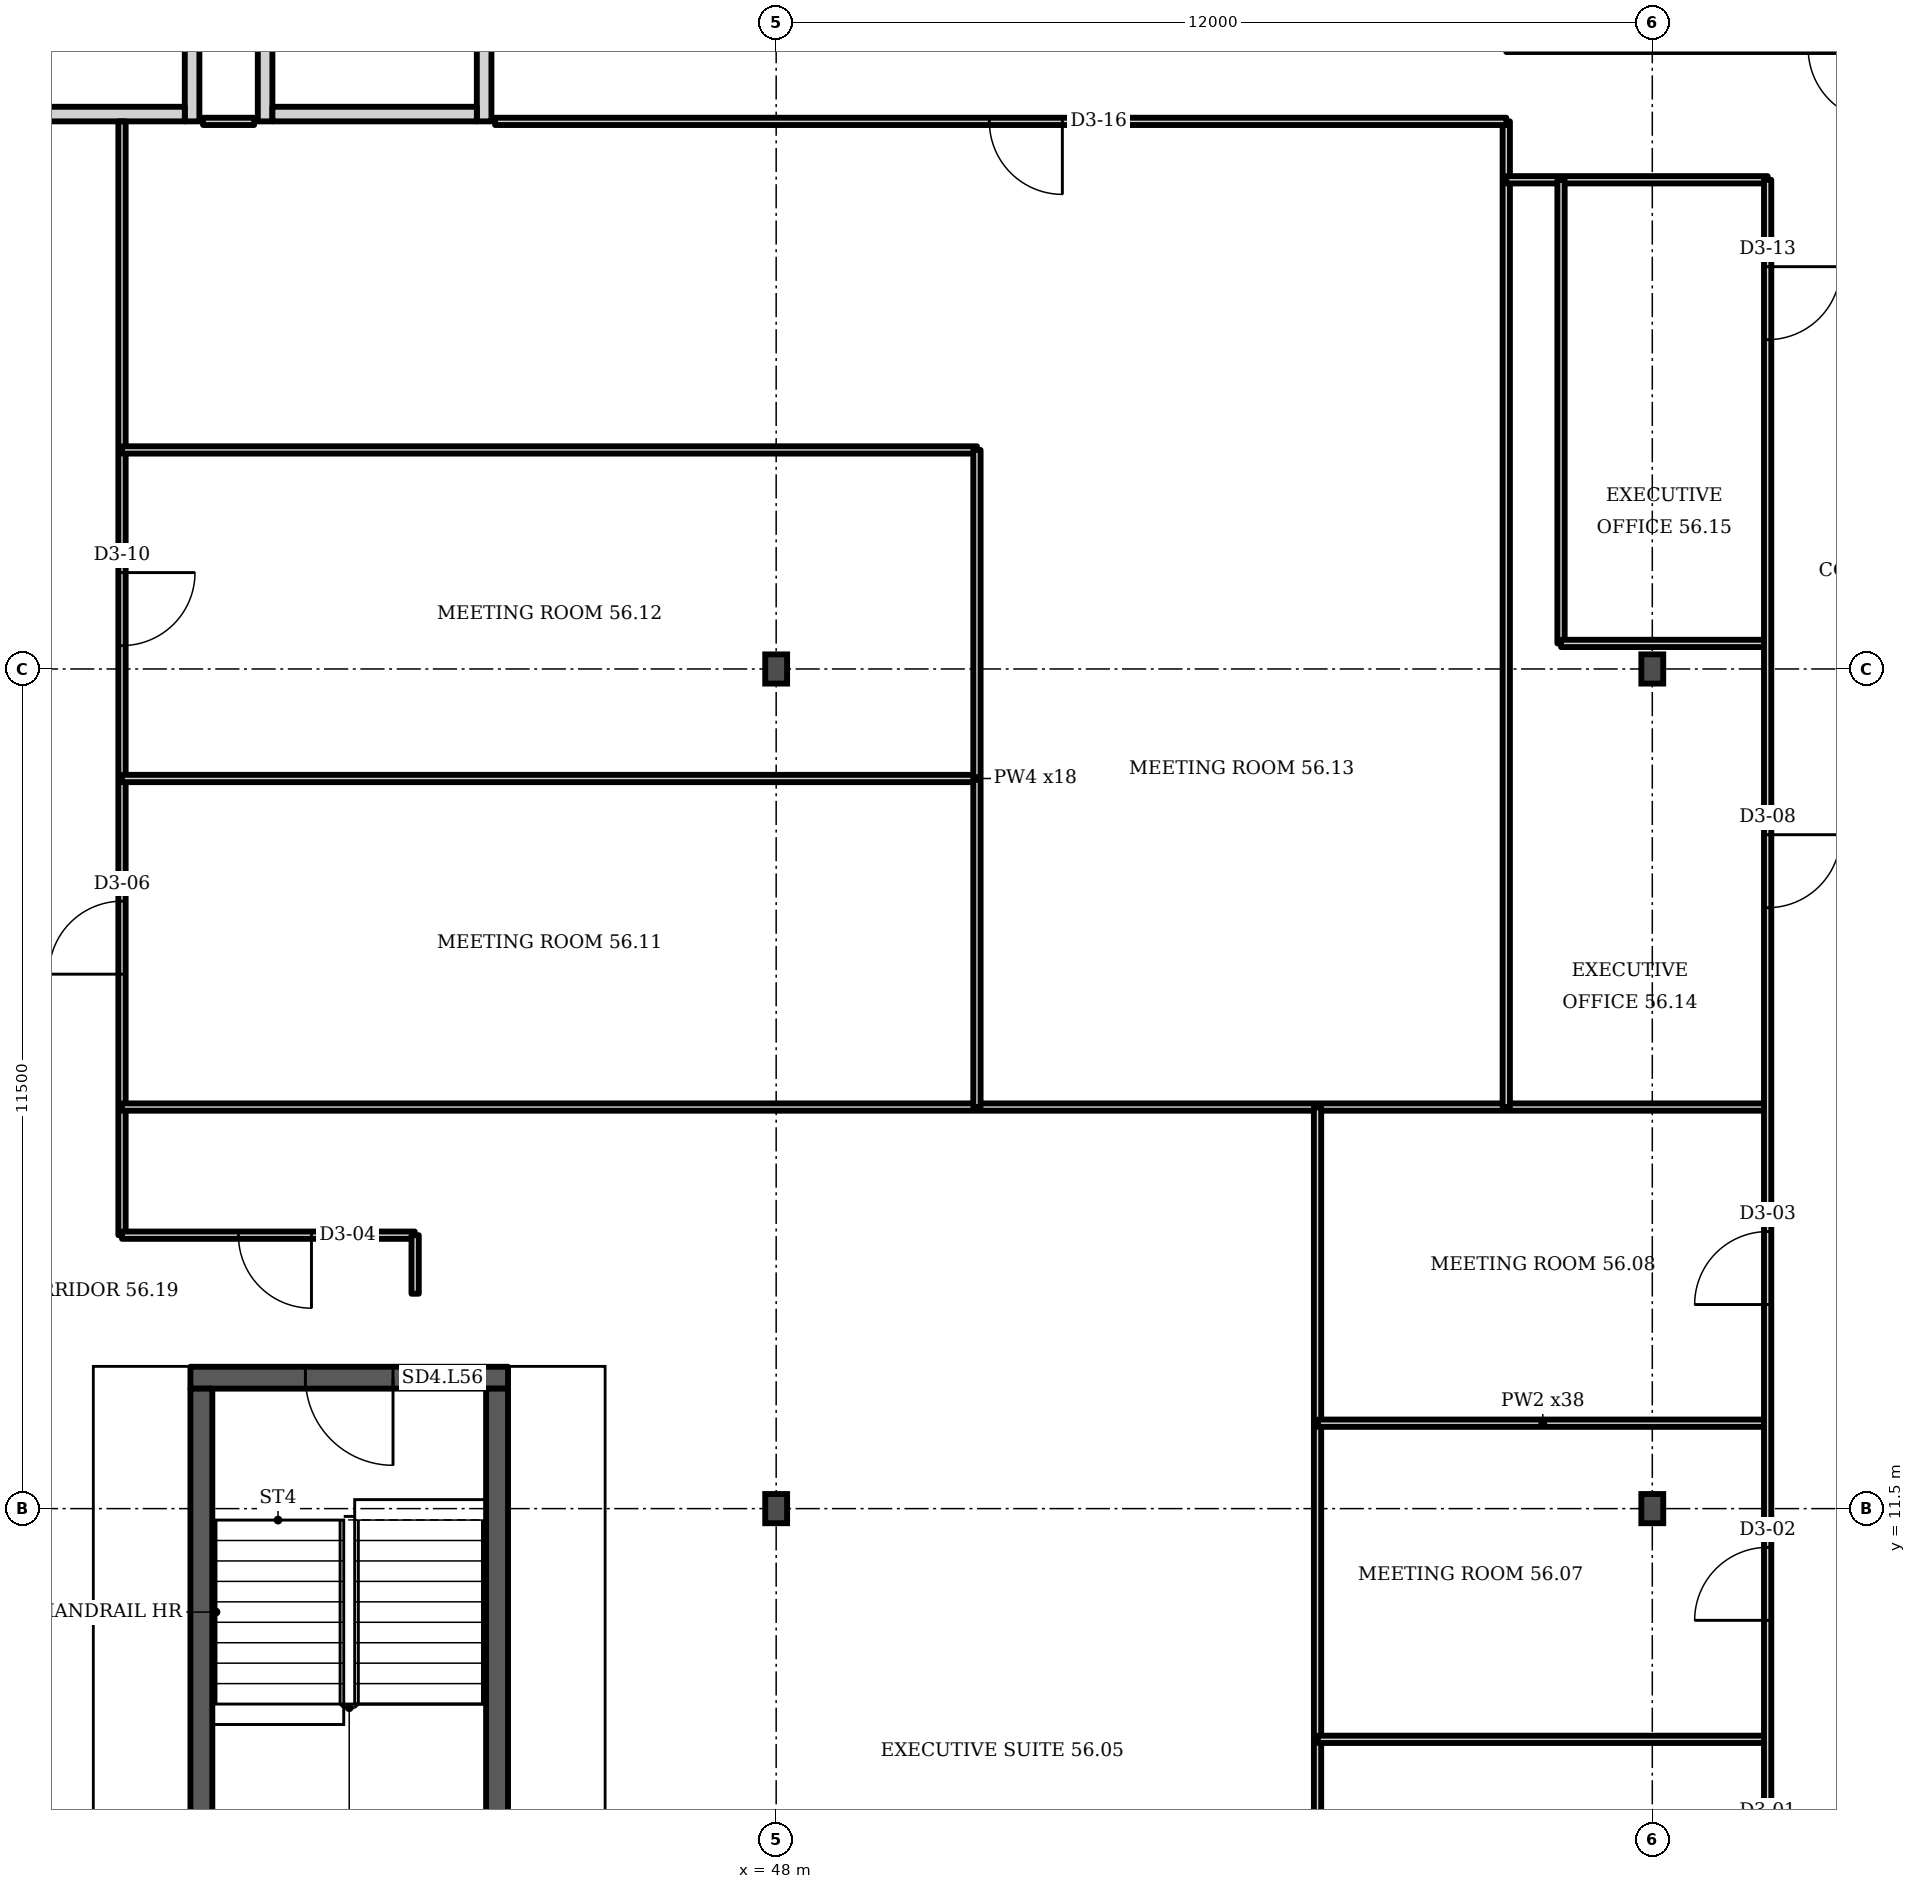
"""IFC4 building model, lengths in metres.
Left out: names, types, materials, properties, quantities, classifications, styles, units other than length and angle.
Written with IfcOpenShell. Run it as: python <this file> out.ifc"""

import sys

from ifc_helpers import new_model, si_unit, direction, frame, frame_2d, origin, origin_2d, place, context, subcontext, project, spatial, rectangle, i_section, extrude, element, fill, save


model = new_model("IFC4")
c1 = context("Model", 3, precision=1e-05, world=origin(), true_north=direction((0.0, 1.0)))
c2 = subcontext(c1, "Body", "Model", "MODEL_VIEW")
j1 = project(units=[si_unit("LENGTHUNIT", "METRE"), si_unit("PLANEANGLEUNIT", "RADIAN")], contexts=[c1])
p1 = place(None, origin())
s1 = spatial("IfcSite", under=j1, at=p1, CompositionType="ELEMENT")
p2 = place(p1, origin())
s2 = spatial("IfcBuilding", under=s1, at=p2, CompositionType="ELEMENT")
p3 = place(p2, frame((0.0, 0.0, 225.1)))
s3 = spatial("IfcBuildingStorey", under=s2, at=p3, CompositionType="ELEMENT", Elevation=225.1)
for number, where, z_axis, x_axis in (
    (1, (48.0, 11.5, 0.0), (0.0, 0.0, 1.0), (1.0, 0.0, 0.0)),
    (2, (60.0, 11.5, 0.0), (0.0, 0.0, 1.0), (1.0, 0.0, 0.0)),
    (3, (48.0, 23.0, 0.0), (0.0, 0.0, 1.0), (1.0, 0.0, 0.0)),
    (4, (60.0, 23.0, 0.0), (0.0, 0.0, 1.0), (1.0, 0.0, 0.0)),
):
    element("IfcColumn", number, at=place(p3, frame(where, z_axis=z_axis, x_axis=x_axis)), inside=s3, PredefinedType="COLUMN", context=c2, shape_type="SweptSolid", body=[
        extrude(i_section(OverallWidth=0.3, OverallDepth=0.4, WebThickness=0.013, FlangeThickness=0.024, FilletRadius=0.027, at=origin_2d()), origin(), (0.0, 0.0, 1.0), 3.6),
    ])
p4 = place(p3, frame((40.0, 30.5, 0.0), z_axis=(0.0, 0.0, 1.0), x_axis=(0.0, 1.0, 0.0)))
e5 = element("IfcWall", 5, at=p4, inside=s3, PredefinedType="PARTITIONING", context=c2, shape_type="SweptSolid", body=[
    extrude(rectangle(XDim=3.5, YDim=0.2, at=frame_2d((1.75, 0.0))), origin(), (0.0, 0.0, 1.0), 3.2),
])
p5 = place(p3, frame((37.1, 30.6, 0.0), z_axis=(0.0, 0.0, 1.0), x_axis=(1.0, 0.0, 0.0)))
e6 = element("IfcWall", 6, at=p5, inside=s3, PredefinedType="PARTITIONING", context=c2, shape_type="SweptSolid", body=[
    extrude(rectangle(XDim=2.8, YDim=0.2, at=frame_2d((1.4, 0.0))), origin(), (0.0, 0.0, 1.0), 3.2),
])
p6 = place(p3, frame((41.0, 30.5, 0.0), z_axis=(0.0, 0.0, 1.0), x_axis=(0.0, 1.0, 0.0)))
e7 = element("IfcWall", 7, at=p6, inside=s3, PredefinedType="PARTITIONING", context=c2, shape_type="SweptSolid", body=[
    extrude(rectangle(XDim=3.5, YDim=0.2, at=frame_2d((1.75, 0.0))), origin(), (0.0, 0.0, 1.0), 3.2),
])
p7 = place(p3, frame((44.0, 30.5, 0.0), z_axis=(0.0, 0.0, 1.0), x_axis=(0.0, 1.0, 0.0)))
e8 = element("IfcWall", 8, at=p7, inside=s3, PredefinedType="PARTITIONING", context=c2, shape_type="SweptSolid", body=[
    extrude(rectangle(XDim=3.5, YDim=0.2, at=frame_2d((1.75, 0.0))), origin(), (0.0, 0.0, 1.0), 3.2),
])
p8 = place(p7, frame((1.2, 0.0, 0.0)))
e9 = element("IfcOpeningElement", 9, at=p8, cuts=e8, PredefinedType="OPENING", context=c2, shape_type="SweptSolid", body=[
    extrude(rectangle(XDim=1.1, YDim=2.1, at=frame_2d((0.55, 1.05))), frame((0.0, 0.11, 0.0), z_axis=(0.0, -1.0, 0.0), x_axis=(1.0, 0.0, 0.0)), (0.0, 0.0, 1.0), 0.22),
])
p9 = place(p3, frame((41.1, 30.6, 0.0), z_axis=(0.0, 0.0, 1.0), x_axis=(1.0, 0.0, 0.0)))
e10 = element("IfcWall", 10, at=p9, inside=s3, PredefinedType="PARTITIONING", context=c2, shape_type="SweptSolid", body=[
    extrude(rectangle(XDim=2.8, YDim=0.2, at=frame_2d((1.4, 0.0))), origin(), (0.0, 0.0, 1.0), 3.2),
])
p10 = place(p3, frame((39.977, 13.293, 0.0), z_axis=(0.0, 0.0, 1.0), x_axis=(1.0, 0.0, 0.0)))
e11 = element("IfcWall", 11, at=p10, inside=s3, PredefinedType="SHEAR", context=c2, shape_type="SweptSolid", body=[
    extrude(rectangle(XDim=4.35, YDim=0.3, at=frame_2d((2.175, 0.0))), origin(), (0.0, 0.0, 1.0), 3.2),
])
p11 = place(p10, frame((1.575, 0.0, 0.0)))
e12 = element("IfcOpeningElement", 12, at=p11, cuts=e11, PredefinedType="OPENING", context=c2, shape_type="SweptSolid", body=[
    extrude(rectangle(XDim=1.2, YDim=2.1, at=frame_2d((0.6, 1.05))), frame((0.0, 0.16, 0.0), z_axis=(0.0, -1.0, 0.0), x_axis=(1.0, 0.0, 0.0)), (0.0, 0.0, 1.0), 0.32),
])
p12 = place(p3, frame((39.04, 15.245, 0.0), z_axis=(0.0, 0.0, 1.0), x_axis=(0.0, 1.0, 0.0)))
e13 = element("IfcWall", 13, at=p12, inside=s3, PredefinedType="PARTITIONING", context=c2, shape_type="SweptSolid", body=[
    extrude(rectangle(XDim=15.255, YDim=0.1, at=frame_2d((7.627, 0.0))), origin(), (0.0, 0.0, 1.0), 3.2),
])
p13 = place(p12, frame((3.575, 0.0, 0.0)))
e14 = element("IfcOpeningElement", 14, at=p13, cuts=e13, PredefinedType="OPENING", context=c2, shape_type="SweptSolid", body=[
    extrude(rectangle(XDim=1.0, YDim=2.1, at=frame_2d((0.5, 1.05))), frame((0.0, 0.06, 0.0), z_axis=(0.0, -1.0, 0.0), x_axis=(1.0, 0.0, 0.0)), (0.0, 0.0, 1.0), 0.12),
])
p14 = place(p12, frame((8.075, 0.0, 0.0)))
e15 = element("IfcOpeningElement", 15, at=p14, cuts=e13, PredefinedType="OPENING", context=c2, shape_type="SweptSolid", body=[
    extrude(rectangle(XDim=1.0, YDim=2.1, at=frame_2d((0.5, 1.05))), frame((0.0, 0.06, 0.0), z_axis=(0.0, -1.0, 0.0), x_axis=(1.0, 0.0, 0.0)), (0.0, 0.0, 1.0), 0.12),
])
p15 = place(p3, frame((39.04, 15.245, 0.0), z_axis=(0.0, 0.0, 1.0), x_axis=(1.0, 0.0, 0.0)))
e16 = element("IfcWall", 16, at=p15, inside=s3, PredefinedType="PARTITIONING", context=c2, shape_type="SweptSolid", body=[
    extrude(rectangle(XDim=4.01, YDim=0.1, at=frame_2d((2.005, 0.0))), origin(), (0.0, 0.0, 1.0), 3.2),
])
p16 = place(p15, frame((1.595, 0.0, 0.0)))
e17 = element("IfcOpeningElement", 17, at=p16, cuts=e16, PredefinedType="OPENING", context=c2, shape_type="SweptSolid", body=[
    extrude(rectangle(XDim=1.0, YDim=2.1, at=frame_2d((0.5, 1.05))), frame((0.0, 0.06, 0.0), z_axis=(0.0, -1.0, 0.0), x_axis=(1.0, 0.0, 0.0)), (0.0, 0.0, 1.0), 0.12),
])
p17 = place(p3, frame((39.04, 17.0, 0.0), z_axis=(0.0, 0.0, 1.0), x_axis=(1.0, 0.0, 0.0)))
e18 = element("IfcWall", 18, at=p17, inside=s3, PredefinedType="PARTITIONING", context=c2, shape_type="SweptSolid", body=[
    extrude(rectangle(XDim=22.54, YDim=0.1, at=frame_2d((11.27, 0.0))), origin(), (0.0, 0.0, 1.0), 3.2),
])
for number, where, z_axis, x_axis in (
    (19, (39.04, 21.5, 0.0), (0.0, 0.0, 1.0), (1.0, 0.0, 0.0)),
    (20, (39.04, 26.0, 0.0), (0.0, 0.0, 1.0), (1.0, 0.0, 0.0)),
):
    element("IfcWall", number, at=place(p3, frame(where, z_axis=z_axis, x_axis=x_axis)), inside=s3, PredefinedType="PARTITIONING", context=c2, shape_type="SweptSolid", body=[
        extrude(rectangle(XDim=11.71, YDim=0.1, at=frame_2d((5.855, 0.0))), origin(), (0.0, 0.0, 1.0), 3.2),
    ])
p18 = place(p3, frame((40.15, 30.5, 0.0), z_axis=(0.0, 0.0, 1.0), x_axis=(1.0, 0.0, 0.0)))
e21 = element("IfcWall", 21, at=p18, inside=s3, PredefinedType="PARTITIONING", context=c2, shape_type="SweptSolid", body=[
    extrude(rectangle(XDim=0.7, YDim=0.1, at=frame_2d((0.35, 0.0))), origin(), (0.0, 0.0, 1.0), 3.2),
])
p19 = place(p3, frame((43.055, 14.443, 0.0), z_axis=(0.0, 0.0, 1.0), x_axis=(0.0, 1.0, 0.0)))
e22 = element("IfcWall", 22, at=p19, inside=s3, PredefinedType="PARTITIONING", context=c2, shape_type="SweptSolid", body=[
    extrude(rectangle(XDim=0.802, YDim=0.1, at=frame_2d((0.401, 0.0))), origin(), (0.0, 0.0, 1.0), 3.2),
])
p20 = place(p3, frame((50.75, 17.0, 0.0), z_axis=(0.0, 0.0, 1.0), x_axis=(0.0, 1.0, 0.0)))
e23 = element("IfcWall", 23, at=p20, inside=s3, PredefinedType="PARTITIONING", context=c2, shape_type="SweptSolid", body=[
    extrude(rectangle(XDim=9.0, YDim=0.1, at=frame_2d((4.5, 0.0))), origin(), (0.0, 0.0, 1.0), 3.2),
])
p21 = place(p3, frame((55.415, 4.345, 0.0), z_axis=(0.0, 0.0, 1.0), x_axis=(0.0, 1.0, 0.0)))
e24 = element("IfcWall", 24, at=p21, inside=s3, PredefinedType="PARTITIONING", context=c2, shape_type="SweptSolid", body=[
    extrude(rectangle(XDim=12.65, YDim=0.1, at=frame_2d((6.325, 0.0))), origin(), (0.0, 0.0, 1.0), 3.2),
])
for number, where, z_axis, x_axis in (
    (25, (55.42, 8.34, 0.0), (0.0, 0.0, 1.0), (1.0, 0.0, 0.0)),
    (26, (55.42, 12.67, 0.0), (0.0, 0.0, 1.0), (1.0, 0.0, 0.0)),
):
    element("IfcWall", number, at=place(p3, frame(where, z_axis=z_axis, x_axis=x_axis)), inside=s3, PredefinedType="PARTITIONING", context=c2, shape_type="SweptSolid", body=[
        extrude(rectangle(XDim=6.16, YDim=0.1, at=frame_2d((3.08, 0.0))), origin(), (0.0, 0.0, 1.0), 3.2),
    ])
p22 = place(p3, frame((58.0, 17.0, 0.0), z_axis=(0.0, 0.0, 1.0), x_axis=(0.0, 1.0, 0.0)))
e27 = element("IfcWall", 27, at=p22, inside=s3, PredefinedType="PARTITIONING", context=c2, shape_type="SweptSolid", body=[
    extrude(rectangle(XDim=13.5, YDim=0.1, at=frame_2d((6.75, 0.0))), origin(), (0.0, 0.0, 1.0), 3.2),
])
p23 = place(p3, frame((58.0, 29.7, 0.0), z_axis=(0.0, 0.0, 1.0), x_axis=(1.0, 0.0, 0.0)))
e28 = element("IfcWall", 28, at=p23, inside=s3, PredefinedType="PARTITIONING", context=c2, shape_type="SweptSolid", body=[
    extrude(rectangle(XDim=3.58, YDim=0.1, at=frame_2d((1.79, 0.0))), origin(), (0.0, 0.0, 1.0), 3.2),
])
p24 = place(p3, frame((58.75, 23.35, 0.0), z_axis=(0.0, 0.0, 1.0), x_axis=(0.0, 1.0, 0.0)))
e29 = element("IfcWall", 29, at=p24, inside=s3, PredefinedType="PARTITIONING", context=c2, shape_type="SweptSolid", body=[
    extrude(rectangle(XDim=6.35, YDim=0.1, at=frame_2d((3.175, 0.0))), origin(), (0.0, 0.0, 1.0), 3.2),
])
p25 = place(p3, frame((58.75, 23.35, 0.0), z_axis=(0.0, 0.0, 1.0), x_axis=(1.0, 0.0, 0.0)))
e30 = element("IfcWall", 30, at=p25, inside=s3, PredefinedType="PARTITIONING", context=c2, shape_type="SweptSolid", body=[
    extrude(rectangle(XDim=2.83, YDim=0.1, at=frame_2d((1.415, 0.0))), origin(), (0.0, 0.0, 1.0), 3.2),
])
p26 = place(p3, frame((61.58, 4.88, 0.0), z_axis=(0.0, 0.0, 1.0), x_axis=(0.0, 1.0, 0.0)))
e31 = element("IfcWall", 31, at=p26, inside=s3, PredefinedType="PARTITIONING", context=c2, shape_type="SweptSolid", body=[
    extrude(rectangle(XDim=24.82, YDim=0.1, at=frame_2d((12.41, 0.0))), origin(), (0.0, 0.0, 1.0), 3.2),
])
p27 = place(p26, frame((1.24, 0.0, 0.0)))
e32 = element("IfcOpeningElement", 32, at=p27, cuts=e31, PredefinedType="OPENING", context=c2, shape_type="SweptSolid", body=[
    extrude(rectangle(XDim=1.0, YDim=2.1, at=frame_2d((0.5, 1.05))), frame((0.0, 0.06, 0.0), z_axis=(0.0, -1.0, 0.0), x_axis=(1.0, 0.0, 0.0)), (0.0, 0.0, 1.0), 0.12),
])
p28 = place(p26, frame((5.09, 0.0, 0.0)))
e33 = element("IfcOpeningElement", 33, at=p28, cuts=e31, PredefinedType="OPENING", context=c2, shape_type="SweptSolid", body=[
    extrude(rectangle(XDim=1.0, YDim=2.1, at=frame_2d((0.5, 1.05))), frame((0.0, 0.06, 0.0), z_axis=(0.0, -1.0, 0.0), x_axis=(1.0, 0.0, 0.0)), (0.0, 0.0, 1.0), 0.12),
])
p29 = place(p26, frame((9.415, 0.0, 0.0)))
e34 = element("IfcOpeningElement", 34, at=p29, cuts=e31, PredefinedType="OPENING", context=c2, shape_type="SweptSolid", body=[
    extrude(rectangle(XDim=1.0, YDim=2.1, at=frame_2d((0.5, 1.05))), frame((0.0, 0.06, 0.0), z_axis=(0.0, -1.0, 0.0), x_axis=(1.0, 0.0, 0.0)), (0.0, 0.0, 1.0), 0.12),
])
p30 = place(p26, frame((14.85, 0.0, 0.0)))
e35 = element("IfcOpeningElement", 35, at=p30, cuts=e31, PredefinedType="OPENING", context=c2, shape_type="SweptSolid", body=[
    extrude(rectangle(XDim=1.0, YDim=2.1, at=frame_2d((0.5, 1.05))), frame((0.0, 0.06, 0.0), z_axis=(0.0, -1.0, 0.0), x_axis=(1.0, 0.0, 0.0)), (0.0, 0.0, 1.0), 0.12),
])
p31 = place(p26, frame((22.63, 0.0, 0.0)))
e36 = element("IfcOpeningElement", 36, at=p31, cuts=e31, PredefinedType="OPENING", context=c2, shape_type="SweptSolid", body=[
    extrude(rectangle(XDim=1.0, YDim=2.1, at=frame_2d((0.5, 1.05))), frame((0.0, 0.06, 0.0), z_axis=(0.0, -1.0, 0.0), x_axis=(1.0, 0.0, 0.0)), (0.0, 0.0, 1.0), 0.12),
])
p32 = place(p3, frame((44.15, 30.5, 0.0), z_axis=(0.0, 0.0, 1.0), x_axis=(1.0, 0.0, 0.0)))
e37 = element("IfcWall", 37, at=p32, inside=s3, PredefinedType="PARTITIONING", context=c2, shape_type="SweptSolid", body=[
    extrude(rectangle(XDim=13.85, YDim=0.1, at=frame_2d((6.925, 0.0))), origin(), (0.0, 0.0, 1.0), 3.2),
])
p33 = place(p32, frame((6.77, 0.0, 0.0)))
e38 = element("IfcOpeningElement", 38, at=p33, cuts=e37, PredefinedType="OPENING", context=c2, shape_type="SweptSolid", body=[
    extrude(rectangle(XDim=1.0, YDim=2.1, at=frame_2d((0.5, 1.05))), frame((0.0, 0.06, 0.0), z_axis=(0.0, -1.0, 0.0), x_axis=(1.0, 0.0, 0.0)), (0.0, 0.0, 1.0), 0.12),
])
for number, where, z_axis, x_axis in (
    (39, (40.127, 5.643, 0.0), (0.0, 0.0, 1.0), (0.0, 1.0, 0.0)),
    (40, (44.177, 5.643, 0.0), (0.0, 0.0, 1.0), (0.0, 1.0, 0.0)),
):
    element("IfcWall", number, at=place(p3, frame(where, z_axis=z_axis, x_axis=x_axis)), inside=s3, PredefinedType="SHEAR", context=c2, shape_type="SweptSolid", body=[
        extrude(rectangle(XDim=7.5, YDim=0.3, at=frame_2d((3.75, 0.0))), origin(), (0.0, 0.0, 1.0), 3.2),
    ])
p34 = place(p11, origin())
e41 = element("IfcDoor", 41, at=p34, inside=s3, OperationType="SINGLE_SWING_RIGHT", PredefinedType="DOOR", context=c2, shape_type="SweptSolid", body=[
    extrude(rectangle(XDim=1.2, YDim=2.1, at=frame_2d((0.6, 1.05))), frame((0.0, 0.025, 0.0), z_axis=(0.0, -1.0, 0.0), x_axis=(1.0, 0.0, 0.0)), (0.0, 0.0, 1.0), 0.05),
])
fill(e12, e41)
p35 = place(p28, origin())
e42 = element("IfcDoor", 42, at=p35, inside=s3, OperationType="SINGLE_SWING_LEFT", PredefinedType="DOOR", context=c2, shape_type="SweptSolid", body=[
    extrude(rectangle(XDim=1.0, YDim=2.1, at=frame_2d((0.5, 1.05))), frame((0.0, 0.025, 0.0), z_axis=(0.0, -1.0, 0.0), x_axis=(1.0, 0.0, 0.0)), (0.0, 0.0, 1.0), 0.05),
])
fill(e33, e42)
p36 = place(p29, origin())
e43 = element("IfcDoor", 43, at=p36, inside=s3, OperationType="SINGLE_SWING_LEFT", PredefinedType="DOOR", context=c2, shape_type="SweptSolid", body=[
    extrude(rectangle(XDim=1.0, YDim=2.1, at=frame_2d((0.5, 1.05))), frame((0.0, 0.025, 0.0), z_axis=(0.0, -1.0, 0.0), x_axis=(1.0, 0.0, 0.0)), (0.0, 0.0, 1.0), 0.05),
])
fill(e34, e43)
p37 = place(p16, origin())
e44 = element("IfcDoor", 44, at=p37, inside=s3, OperationType="SINGLE_SWING_RIGHT", PredefinedType="DOOR", context=c2, shape_type="SweptSolid", body=[
    extrude(rectangle(XDim=1.0, YDim=2.1, at=frame_2d((0.5, 1.05))), frame((0.0, 0.025, 0.0), z_axis=(0.0, -1.0, 0.0), x_axis=(1.0, 0.0, 0.0)), (0.0, 0.0, 1.0), 0.05),
])
fill(e17, e44)
p38 = place(p13, origin())
e45 = element("IfcDoor", 45, at=p38, inside=s3, OperationType="SINGLE_SWING_LEFT", PredefinedType="DOOR", context=c2, shape_type="SweptSolid", body=[
    extrude(rectangle(XDim=1.0, YDim=2.1, at=frame_2d((0.5, 1.05))), frame((0.0, 0.025, 0.0), z_axis=(0.0, -1.0, 0.0), x_axis=(1.0, 0.0, 0.0)), (0.0, 0.0, 1.0), 0.05),
])
fill(e14, e45)
p39 = place(p30, origin())
e46 = element("IfcDoor", 46, at=p39, inside=s3, OperationType="SINGLE_SWING_RIGHT", PredefinedType="DOOR", context=c2, shape_type="SweptSolid", body=[
    extrude(rectangle(XDim=1.0, YDim=2.1, at=frame_2d((0.5, 1.05))), frame((0.0, 0.025, 0.0), z_axis=(0.0, -1.0, 0.0), x_axis=(1.0, 0.0, 0.0)), (0.0, 0.0, 1.0), 0.05),
])
fill(e35, e46)
p40 = place(p14, origin())
e47 = element("IfcDoor", 47, at=p40, inside=s3, OperationType="SINGLE_SWING_RIGHT", PredefinedType="DOOR", context=c2, shape_type="SweptSolid", body=[
    extrude(rectangle(XDim=1.0, YDim=2.1, at=frame_2d((0.5, 1.05))), frame((0.0, 0.025, 0.0), z_axis=(0.0, -1.0, 0.0), x_axis=(1.0, 0.0, 0.0)), (0.0, 0.0, 1.0), 0.05),
])
fill(e15, e47)
p41 = place(p31, origin())
e48 = element("IfcDoor", 48, at=p41, inside=s3, OperationType="SINGLE_SWING_RIGHT", PredefinedType="DOOR", context=c2, shape_type="SweptSolid", body=[
    extrude(rectangle(XDim=1.0, YDim=2.1, at=frame_2d((0.5, 1.05))), frame((0.0, 0.025, 0.0), z_axis=(0.0, -1.0, 0.0), x_axis=(1.0, 0.0, 0.0)), (0.0, 0.0, 1.0), 0.05),
])
fill(e36, e48)
p42 = place(p33, origin())
e49 = element("IfcDoor", 49, at=p42, inside=s3, OperationType="SINGLE_SWING_RIGHT", PredefinedType="DOOR", context=c2, shape_type="SweptSolid", body=[
    extrude(rectangle(XDim=1.0, YDim=2.1, at=frame_2d((0.5, 1.05))), frame((0.0, 0.025, 0.0), z_axis=(0.0, -1.0, 0.0), x_axis=(1.0, 0.0, 0.0)), (0.0, 0.0, 1.0), 0.05),
])
fill(e38, e49)
save(model, sys.argv[1])
